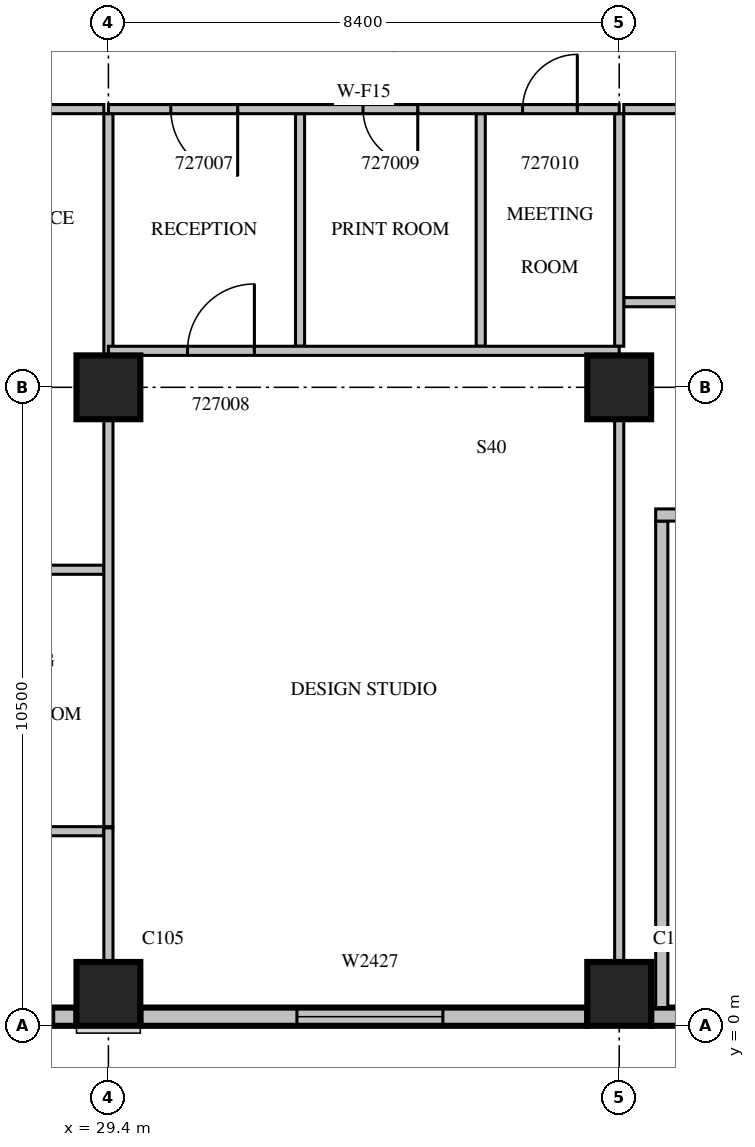
"""IFC4 building model, lengths in metres.
Left out: names, types, materials, properties, quantities, classifications, styles, units other than length and angle.
Written with IfcOpenShell. Run it as: python <this file> out.ifc"""

import sys

from ifc_helpers import new_model, si_unit, direction, frame, frame_2d, origin, origin_2d, place, context, subcontext, project, spatial, rectangle, extrude, source, transform, mapped, element, fill, save


model = new_model("IFC4")
c1 = context("Model", 3, precision=1e-05, world=origin(), true_north=direction((0.0, 1.0)))
c2 = subcontext(c1, "Body", "Model", "MODEL_VIEW")
j1 = project(units=[si_unit("LENGTHUNIT", "METRE"), si_unit("PLANEANGLEUNIT", "RADIAN")], contexts=[c1])
p1 = place(None, origin())
s1 = spatial("IfcSite", under=j1, at=p1, CompositionType="ELEMENT")
p2 = place(p1, origin())
s2 = spatial("IfcBuilding", under=s1, at=p2, CompositionType="ELEMENT")
p3 = place(p2, frame((0.0, 0.0, 124.5)))
s3 = spatial("IfcBuildingStorey", under=s2, at=p3, CompositionType="ELEMENT", Elevation=124.5)
m1 = source(origin(), c2, "Body", "SweptSolid", [
    extrude(rectangle(XDim=1.05, YDim=1.05, at=origin_2d()), origin(), (0.0, 0.0, 1.0), 4.2),
])
for number, where, z_axis, x_axis in (
    (1, (29.4, 0.525, 0.0), (0.0, 0.0, 1.0), (1.0, 0.0, 0.0)),
    (2, (37.8, 0.525, 0.0), (0.0, 0.0, 1.0), (1.0, 0.0, 0.0)),
    (3, (29.4, 10.5, 0.0), (0.0, 0.0, 1.0), (1.0, 0.0, 0.0)),
    (4, (37.8, 10.5, 0.0), (0.0, 0.0, 1.0), (1.0, 0.0, 0.0)),
):
    element("IfcColumn", number, at=place(p3, frame(where, z_axis=z_axis, x_axis=x_axis)), inside=s3, PredefinedType="COLUMN", context=c2, shape_type="MappedRepresentation", body=[
        mapped(m1, transform((0.0, 0.0, 0.0), scale=1.0)),
    ])
m2 = source(origin(), c2, "Body", "SweptSolid", [
    extrude(rectangle(XDim=7.35, YDim=0.3, at=frame_2d((3.675, 0.0))), origin(), (0.0, 0.0, 1.0), 3.8),
])
p4 = place(p3, frame((21.525, 0.15, 0.0), z_axis=(0.0, 0.0, 1.0), x_axis=(1.0, 0.0, 0.0)))
e5 = element("IfcWall", 5, at=p4, inside=s3, PredefinedType="STANDARD", context=c2, shape_type="MappedRepresentation", body=[
    mapped(m2, transform((0.0, 0.0, 0.0), scale=1.0)),
])
m3 = source(origin(), c2, "Body", "SweptSolid", [
    extrude(rectangle(XDim=2.4, YDim=2.7, at=frame_2d((1.2, 1.35))), frame((0.0, 0.16, 0.0), z_axis=(0.0, -1.0, 0.0), x_axis=(1.0, 0.0, 0.0)), (0.0, 0.0, 1.0), 0.32),
])
p5 = place(p4, frame((0.375, 0.0, 0.6)))
e6 = element("IfcOpeningElement", 6, at=p5, cuts=e5, PredefinedType="OPENING", context=c2, shape_type="MappedRepresentation", body=[
    mapped(m3, transform((0.0, 0.0, 0.0), scale=1.0)),
])
p6 = place(p4, frame((4.575, 0.0, 0.6)))
e7 = element("IfcOpeningElement", 7, at=p6, cuts=e5, PredefinedType="OPENING", context=c2, shape_type="MappedRepresentation", body=[
    mapped(m3, transform((0.0, 0.0, 0.0), scale=1.0)),
])
p7 = place(p3, frame((29.925, 0.15, 0.0), z_axis=(0.0, 0.0, 1.0), x_axis=(1.0, 0.0, 0.0)))
e8 = element("IfcWall", 8, at=p7, inside=s3, PredefinedType="STANDARD", context=c2, shape_type="MappedRepresentation", body=[
    mapped(m2, transform((0.0, 0.0, 0.0), scale=1.0)),
])
p8 = place(p7, frame((2.575, 0.0, 0.6)))
e9 = element("IfcOpeningElement", 9, at=p8, cuts=e8, PredefinedType="OPENING", context=c2, shape_type="MappedRepresentation", body=[
    mapped(m3, transform((0.0, 0.0, 0.0), scale=1.0)),
])
m4 = source(origin(), c2, "Body", "SweptSolid", [
    extrude(rectangle(XDim=1.875, YDim=0.3, at=frame_2d((0.938, 0.0))), origin(), (0.0, 0.0, 1.0), 3.8),
])
p9 = place(p3, frame((38.325, 0.15, 0.0), z_axis=(0.0, 0.0, 1.0), x_axis=(1.0, 0.0, 0.0)))
e10 = element("IfcWall", 10, at=p9, inside=s3, PredefinedType="STANDARD", context=c2, shape_type="MappedRepresentation", body=[
    mapped(m4, transform((0.0, 0.0, 0.0), scale=1.0)),
])
m5 = source(origin(), c2, "Body", "SweptSolid", [
    extrude(rectangle(XDim=8.0, YDim=0.2, at=frame_2d((4.0, 0.0))), origin(), (0.0, 0.0, 1.0), 3.8),
])
p10 = place(p3, frame((38.5, 0.3, 0.0), z_axis=(0.0, 0.0, 1.0), x_axis=(0.0, 1.0, 0.0)))
e11 = element("IfcWall", 11, at=p10, inside=s3, PredefinedType="PARTITIONING", context=c2, shape_type="MappedRepresentation", body=[
    mapped(m5, transform((0.0, 0.0, 0.0), scale=1.0)),
])
m6 = source(origin(), c2, "Body", "SweptSolid", [
    extrude(rectangle(XDim=5.45, YDim=0.2, at=frame_2d((2.725, 0.0))), origin(), (0.0, 0.0, 1.0), 3.8),
])
p11 = place(p3, frame((38.4, 8.4, 0.0), z_axis=(0.0, 0.0, 1.0), x_axis=(1.0, 0.0, 0.0)))
e12 = element("IfcWall", 12, at=p11, inside=s3, PredefinedType="PARTITIONING", context=c2, shape_type="MappedRepresentation", body=[
    mapped(m6, transform((0.0, 0.0, 0.0), scale=1.0)),
])
m7 = source(origin(), c2, "Body", "SweptSolid", [
    extrude(rectangle(XDim=1.2, YDim=2.1, at=frame_2d((0.6, 1.05))), frame((0.0, 0.11, 0.0), z_axis=(0.0, -1.0, 0.0), x_axis=(1.0, 0.0, 0.0)), (0.0, 0.0, 1.0), 0.22),
])
p12 = place(p11, frame((0.4, 0.0, 0.0)))
e13 = element("IfcOpeningElement", 13, at=p12, cuts=e12, PredefinedType="OPENING", context=c2, shape_type="MappedRepresentation", body=[
    mapped(m7, transform((0.0, 0.0, 0.0), scale=1.0)),
])
m8 = source(origin(), c2, "Body", "SweptSolid", [
    extrude(rectangle(XDim=0.9, YDim=2.1, at=frame_2d((0.45, 1.05))), frame((0.0, 0.11, 0.0), z_axis=(0.0, -1.0, 0.0), x_axis=(1.0, 0.0, 0.0)), (0.0, 0.0, 1.0), 0.22),
])
p13 = place(p11, frame((3.25, 0.0, 0.0)))
e14 = element("IfcOpeningElement", 14, at=p13, cuts=e12, PredefinedType="OPENING", context=c2, shape_type="MappedRepresentation", body=[
    mapped(m8, transform((0.0, 0.0, 0.0), scale=1.0)),
])
m9 = source(origin(), c2, "Body", "SweptSolid", [
    extrude(rectangle(XDim=3.05, YDim=0.15, at=frame_2d((1.525, 0.0))), origin(), (0.0, 0.0, 1.0), 3.8),
])
for number, where, z_axis, x_axis in (
    (15, (29.325, 7.5, 0.0), (0.0, 0.0, 1.0), (-1.0, 0.0, 0.0)),
    (16, (29.325, 15.075, 0.0), (0.0, 0.0, 1.0), (-1.0, 0.0, 0.0)),
):
    element("IfcWall", number, at=place(p3, frame(where, z_axis=z_axis, x_axis=x_axis)), inside=s3, PredefinedType="PARTITIONING", context=c2, shape_type="MappedRepresentation", body=[
        mapped(m9, transform((0.0, 0.0, 0.0), scale=1.0)),
    ])
m10 = source(origin(), c2, "Body", "SweptSolid", [
    extrude(rectangle(XDim=6.701, YDim=0.15, at=frame_2d((3.35, 0.0))), origin(), (0.0, 0.0, 1.0), 3.8),
])
p14 = place(p3, frame((29.4, 3.275, 0.0), z_axis=(0.0, 0.0, 1.0), x_axis=(0.0, 1.0, 0.0)))
e17 = element("IfcWall", 17, at=p14, inside=s3, PredefinedType="PARTITIONING", context=c2, shape_type="MappedRepresentation", body=[
    mapped(m10, transform((0.0, 0.0, 0.0), scale=1.0)),
])
m11 = source(origin(), c2, "Body", "SweptSolid", [
    extrude(rectangle(XDim=3.976, YDim=0.15, at=frame_2d((1.988, 0.0))), origin(), (0.0, 0.0, 1.0), 3.8),
])
p15 = place(p3, frame((29.4, 11.024, 0.0), z_axis=(0.0, 0.0, 1.0), x_axis=(0.0, 1.0, 0.0)))
e18 = element("IfcWall", 18, at=p15, inside=s3, PredefinedType="PARTITIONING", context=c2, shape_type="MappedRepresentation", body=[
    mapped(m11, transform((0.0, 0.0, 0.0), scale=1.0)),
])
m12 = source(origin(), c2, "Body", "SweptSolid", [
    extrude(rectangle(XDim=7.325, YDim=0.15, at=frame_2d((3.663, 0.0))), origin(), (0.0, 0.0, 1.0), 3.8),
])
p16 = place(p3, frame((22.0, 3.2, 0.0), z_axis=(0.0, 0.0, 1.0), x_axis=(1.0, 0.0, 0.0)))
e19 = element("IfcWall", 19, at=p16, inside=s3, PredefinedType="PARTITIONING", context=c2, shape_type="MappedRepresentation", body=[
    mapped(m12, transform((0.0, 0.0, 0.0), scale=1.0)),
])
m13 = source(origin(), c2, "Body", "SweptSolid", [
    extrude(rectangle(XDim=1.0, YDim=2.1, at=frame_2d((0.5, 1.05))), frame((0.0, 0.085, 0.0), z_axis=(0.0, -1.0, 0.0), x_axis=(1.0, 0.0, 0.0)), (0.0, 0.0, 1.0), 0.17),
])
p17 = place(p16, frame((3.0, 0.0, 0.0)))
e20 = element("IfcOpeningElement", 20, at=p17, cuts=e19, PredefinedType="OPENING", context=c2, shape_type="MappedRepresentation", body=[
    mapped(m13, transform((0.0, 0.0, 0.0), scale=1.0)),
])
m14 = source(origin(), c2, "Body", "SweptSolid", [
    extrude(rectangle(XDim=0.9, YDim=2.1, at=frame_2d((0.45, 1.05))), frame((0.0, 0.085, 0.0), z_axis=(0.0, -1.0, 0.0), x_axis=(1.0, 0.0, 0.0)), (0.0, 0.0, 1.0), 0.17),
])
p18 = place(p16, frame((4.413, 0.0, 0.0)))
e21 = element("IfcOpeningElement", 21, at=p18, cuts=e19, PredefinedType="OPENING", context=c2, shape_type="MappedRepresentation", body=[
    mapped(m14, transform((0.0, 0.0, 0.0), scale=1.0)),
])
m15 = source(origin(), c2, "Body", "SweptSolid", [
    extrude(rectangle(XDim=6.45, YDim=0.15, at=frame_2d((3.225, 0.0))), origin(), (0.0, 0.0, 1.0), 3.8),
])
p19 = place(p3, frame((37.875, 11.9, 0.0), z_axis=(0.0, 0.0, 1.0), x_axis=(1.0, 0.0, 0.0)))
e22 = element("IfcWall", 22, at=p19, inside=s3, PredefinedType="PARTITIONING", context=c2, shape_type="MappedRepresentation", body=[
    mapped(m15, transform((0.0, 0.0, 0.0), scale=1.0)),
])
p20 = place(p3, frame((44.325, 15.075, 0.0), z_axis=(0.0, 0.0, 1.0), x_axis=(-1.0, 0.0, 0.0)))
e23 = element("IfcWall", 23, at=p20, inside=s3, PredefinedType="PARTITIONING", context=c2, shape_type="MappedRepresentation", body=[
    mapped(m15, transform((0.0, 0.0, 0.0), scale=1.0)),
])
p21 = place(p20, frame((2.812, 0.0, 0.0)))
e24 = element("IfcOpeningElement", 24, at=p21, cuts=e23, PredefinedType="OPENING", context=c2, shape_type="MappedRepresentation", body=[
    mapped(m14, transform((0.0, 0.0, 0.0), scale=1.0)),
])
m16 = source(origin(), c2, "Body", "SweptSolid", [
    extrude(rectangle(XDim=3.825, YDim=0.15, at=frame_2d((1.913, 0.0))), origin(), (0.0, 0.0, 1.0), 3.8),
])
for number, where, z_axis, x_axis in (
    (25, (32.551, 11.175, 0.0), (0.0, 0.0, 1.0), (0.0, 1.0, 0.0)),
    (26, (35.523, 11.175, 0.0), (0.0, 0.0, 1.0), (0.0, 1.0, 0.0)),
):
    element("IfcWall", number, at=place(p3, frame(where, z_axis=z_axis, x_axis=x_axis)), inside=s3, PredefinedType="PARTITIONING", context=c2, shape_type="MappedRepresentation", body=[
        mapped(m16, transform((0.0, 0.0, 0.0), scale=1.0)),
    ])
m17 = source(origin(), c2, "Body", "SweptSolid", [
    extrude(rectangle(XDim=2.206, YDim=0.15, at=frame_2d((1.103, 0.0))), origin(), (0.0, 0.0, 1.0), 3.8),
])
p22 = place(p3, frame((29.4, 1.049, 0.0), z_axis=(0.0, 0.0, 1.0), x_axis=(0.0, 1.0, 0.0)))
e27 = element("IfcWall", 27, at=p22, inside=s3, PredefinedType="PARTITIONING", context=c2, shape_type="MappedRepresentation", body=[
    mapped(m17, transform((0.0, 0.0, 0.0), scale=1.0)),
])
m18 = source(origin(), c2, "Body", "SweptSolid", [
    extrude(rectangle(XDim=8.927, YDim=0.15, at=frame_2d((4.463, 0.0))), origin(), (0.0, 0.0, 1.0), 3.8),
])
p23 = place(p3, frame((37.8, 1.049, 0.0), z_axis=(0.0, 0.0, 1.0), x_axis=(0.0, 1.0, 0.0)))
e28 = element("IfcWall", 28, at=p23, inside=s3, PredefinedType="PARTITIONING", context=c2, shape_type="MappedRepresentation", body=[
    mapped(m18, transform((0.0, 0.0, 0.0), scale=1.0)),
])
p24 = place(p3, frame((37.8, 11.175, 0.0), z_axis=(0.0, 0.0, 1.0), x_axis=(0.0, 1.0, 0.0)))
e29 = element("IfcWall", 29, at=p24, inside=s3, PredefinedType="PARTITIONING", context=c2, shape_type="MappedRepresentation", body=[
    mapped(m16, transform((0.0, 0.0, 0.0), scale=1.0)),
])
m19 = source(origin(), c2, "Body", "SweptSolid", [
    extrude(rectangle(XDim=8.4, YDim=0.15, at=frame_2d((4.2, 0.0))), origin(), (0.0, 0.0, 1.0), 3.8),
])
p25 = place(p3, frame((37.8, 11.1, 0.0), z_axis=(0.0, 0.0, 1.0), x_axis=(-1.0, 0.0, 0.0)))
e30 = element("IfcWall", 30, at=p25, inside=s3, PredefinedType="PARTITIONING", context=c2, shape_type="MappedRepresentation", body=[
    mapped(m19, transform((0.0, 0.0, 0.0), scale=1.0)),
])
m20 = source(origin(), c2, "Body", "SweptSolid", [
    extrude(rectangle(XDim=1.1, YDim=2.1, at=frame_2d((0.55, 1.05))), frame((0.0, 0.085, 0.0), z_axis=(0.0, -1.0, 0.0), x_axis=(1.0, 0.0, 0.0)), (0.0, 0.0, 1.0), 0.17),
])
p26 = place(p25, frame((5.999, 0.0, 0.0)))
e31 = element("IfcOpeningElement", 31, at=p26, cuts=e30, PredefinedType="OPENING", context=c2, shape_type="MappedRepresentation", body=[
    mapped(m20, transform((0.0, 0.0, 0.0), scale=1.0)),
])
p27 = place(p3, frame((37.8, 15.075, 0.0), z_axis=(0.0, 0.0, 1.0), x_axis=(-1.0, 0.0, 0.0)))
e32 = element("IfcWall", 32, at=p27, inside=s3, PredefinedType="PARTITIONING", context=c2, shape_type="MappedRepresentation", body=[
    mapped(m19, transform((0.0, 0.0, 0.0), scale=1.0)),
])
p28 = place(p27, frame((6.274, 0.0, 0.0)))
e33 = element("IfcOpeningElement", 33, at=p28, cuts=e32, PredefinedType="OPENING", context=c2, shape_type="MappedRepresentation", body=[
    mapped(m20, transform((0.0, 0.0, 0.0), scale=1.0)),
])
p29 = place(p27, frame((3.313, 0.0, 0.0)))
e34 = element("IfcOpeningElement", 34, at=p29, cuts=e32, PredefinedType="OPENING", context=c2, shape_type="MappedRepresentation", body=[
    mapped(m14, transform((0.0, 0.0, 0.0), scale=1.0)),
])
p30 = place(p27, frame((0.689, 0.0, 0.0)))
e35 = element("IfcOpeningElement", 35, at=p30, cuts=e32, PredefinedType="OPENING", context=c2, shape_type="MappedRepresentation", body=[
    mapped(m14, transform((0.0, 0.0, 0.0), scale=1.0)),
])
m21 = source(origin(), c2, "Body", "SweptSolid", [
    extrude(rectangle(XDim=2.4, YDim=2.7, at=frame_2d((1.2, 1.35))), frame((0.0, 0.03, 0.0), z_axis=(0.0, -1.0, 0.0), x_axis=(1.0, 0.0, 0.0)), (0.0, 0.0, 1.0), 0.06),
])
p31 = place(p6, origin())
e36 = element("IfcWindow", 36, at=p31, inside=s3, PartitioningType="SINGLE_PANEL", PredefinedType="WINDOW", context=c2, shape_type="MappedRepresentation", body=[
    mapped(m21, transform((0.0, 0.0, 0.0), scale=1.0)),
])
fill(e7, e36)
p32 = place(p8, origin())
e37 = element("IfcWindow", 37, at=p32, inside=s3, PartitioningType="SINGLE_PANEL", PredefinedType="WINDOW", context=c2, shape_type="MappedRepresentation", body=[
    mapped(m21, transform((0.0, 0.0, 0.0), scale=1.0)),
])
fill(e9, e37)
m22 = source(origin(), c2, "Body", "SweptSolid", [
    extrude(rectangle(XDim=1.1, YDim=2.1, at=frame_2d((0.55, 1.05))), frame((0.0, 0.025, 0.0), z_axis=(0.0, -1.0, 0.0), x_axis=(1.0, 0.0, 0.0)), (0.0, 0.0, 1.0), 0.05),
])
p33 = place(p28, origin())
e38 = element("IfcDoor", 38, at=p33, inside=s3, OperationType="SINGLE_SWING_LEFT", PredefinedType="DOOR", context=c2, shape_type="MappedRepresentation", body=[
    mapped(m22, transform((0.0, 0.0, 0.0), scale=1.0)),
])
fill(e33, e38)
p34 = place(p26, origin())
e39 = element("IfcDoor", 39, at=p34, inside=s3, OperationType="SINGLE_SWING_RIGHT", PredefinedType="DOOR", context=c2, shape_type="MappedRepresentation", body=[
    mapped(m22, transform((0.0, 0.0, 0.0), scale=1.0)),
])
fill(e31, e39)
m23 = source(origin(), c2, "Body", "SweptSolid", [
    extrude(rectangle(XDim=0.9, YDim=2.1, at=frame_2d((0.45, 1.05))), frame((0.0, 0.025, 0.0), z_axis=(0.0, -1.0, 0.0), x_axis=(1.0, 0.0, 0.0)), (0.0, 0.0, 1.0), 0.05),
])
p35 = place(p29, origin())
e40 = element("IfcDoor", 40, at=p35, inside=s3, OperationType="SINGLE_SWING_LEFT", PredefinedType="DOOR", context=c2, shape_type="MappedRepresentation", body=[
    mapped(m23, transform((0.0, 0.0, 0.0), scale=1.0)),
])
fill(e34, e40)
p36 = place(p30, origin())
e41 = element("IfcDoor", 41, at=p36, inside=s3, OperationType="SINGLE_SWING_RIGHT", PredefinedType="DOOR", context=c2, shape_type="MappedRepresentation", body=[
    mapped(m23, transform((0.0, 0.0, 0.0), scale=1.0)),
])
fill(e35, e41)
save(model, sys.argv[1])
